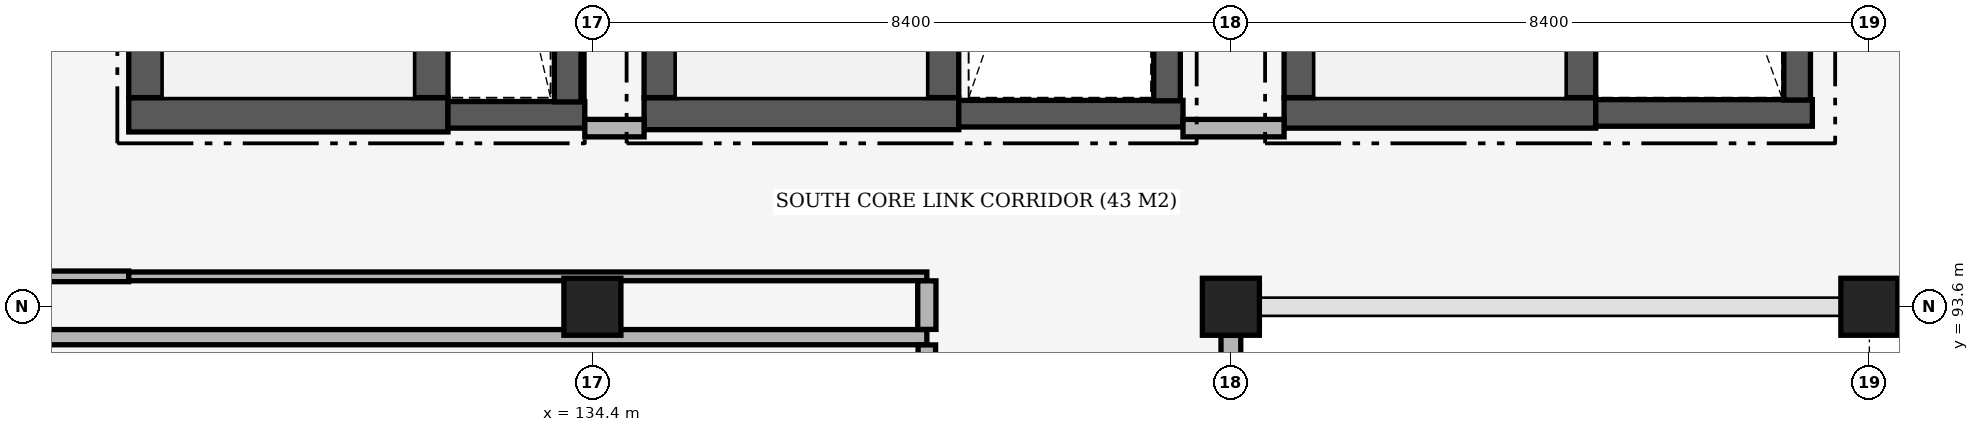
"""IFC4 building model, lengths in metres.
Left out: names, types, materials, properties, quantities, classifications, styles, units other than length and angle.
Written with IfcOpenShell. Run it as: python <this file> out.ifc"""

import sys

from ifc_helpers import new_model, si_unit, direction, frame, frame_2d, origin, origin_2d, place, context, subcontext, project, spatial, rectangle, extrude, element, save


model = new_model("IFC4")
c1 = context("Model", 3, precision=1e-05, world=origin(), true_north=direction((0.0, 1.0)))
c2 = subcontext(c1, "Body", "Model", "MODEL_VIEW")
j1 = project(units=[si_unit("LENGTHUNIT", "METRE"), si_unit("PLANEANGLEUNIT", "RADIAN")], contexts=[c1])
p1 = place(None, origin())
s1 = spatial("IfcSite", under=j1, at=p1, CompositionType="ELEMENT")
p2 = place(p1, origin())
s2 = spatial("IfcBuilding", under=s1, at=p2, CompositionType="ELEMENT")
p3 = place(p2, frame((0.0, 0.0, 15.3)))
s3 = spatial("IfcBuildingStorey", under=s2, at=p3, CompositionType="ELEMENT", Elevation=15.3)
for number, where, z_axis, x_axis in (
    (1, (134.4, 93.6, 0.0), (0.0, 0.0, 1.0), (1.0, 0.0, 0.0)),
    (2, (142.8, 93.6, 0.0), (0.0, 0.0, 1.0), (1.0, 0.0, 0.0)),
    (3, (151.2, 93.6, 0.0), (0.0, 0.0, 1.0), (1.0, 0.0, 0.0)),
):
    element("IfcColumn", number, at=place(p3, frame(where, z_axis=z_axis, x_axis=x_axis)), inside=s3, PredefinedType="COLUMN", context=c2, shape_type="SweptSolid", body=[
        extrude(rectangle(XDim=0.75, YDim=0.75, at=origin_2d()), origin(), (0.0, 0.0, 1.0), 5.1),
    ])
p4 = place(p3, frame((156.225, 93.6, 0.0), z_axis=(0.0, 0.0, 1.0), x_axis=(-1.0, 0.0, 0.0)))
e4 = element("IfcWall", 4, at=p4, inside=s3, PredefinedType="SOLIDWALL", context=c2, shape_type="SweptSolid", body=[
    extrude(rectangle(XDim=4.65, YDim=0.26, at=frame_2d((2.325, 0.0))), origin(), (0.0, 0.0, 1.0), 4.24),
])
p5 = place(p4, frame((2.8, 0.0, 0.9)))
e5 = element("IfcOpeningElement", 5, at=p5, cuts=e4, PredefinedType="OPENING", context=c2, shape_type="SweptSolid", body=[
    extrude(rectangle(XDim=0.9, YDim=2.2, at=frame_2d((0.45, 1.1))), frame((0.0, 0.145, 0.0), z_axis=(0.0, -1.0, 0.0), x_axis=(1.0, 0.0, 0.0)), (0.0, 0.0, 1.0), 0.29),
])
p6 = place(p3, frame((142.8, 93.225, 0.0), z_axis=(0.0, 0.0, 1.0), x_axis=(0.0, -1.0, 0.0)))
e6 = element("IfcWall", 6, at=p6, inside=s3, PredefinedType="SOLIDWALL", context=c2, shape_type="SweptSolid", body=[
    extrude(rectangle(XDim=7.65, YDim=0.26, at=frame_2d((3.825, 0.0))), origin(), (0.0, 0.0, 1.0), 4.14),
])
p7 = place(p6, frame((1.95, 0.0, 0.9)))
e7 = element("IfcOpeningElement", 7, at=p7, cuts=e6, PredefinedType="OPENING", context=c2, shape_type="SweptSolid", body=[
    extrude(rectangle(XDim=0.9, YDim=2.2, at=frame_2d((0.45, 1.1))), frame((0.0, 0.145, 0.0), z_axis=(0.0, -1.0, 0.0), x_axis=(1.0, 0.0, 0.0)), (0.0, 0.0, 1.0), 0.29),
])
p8 = place(p6, frame((4.8, 0.0, 0.9)))
e8 = element("IfcOpeningElement", 8, at=p8, cuts=e6, PredefinedType="OPENING", context=c2, shape_type="SweptSolid", body=[
    extrude(rectangle(XDim=0.9, YDim=2.2, at=frame_2d((0.45, 1.1))), frame((0.0, 0.145, 0.0), z_axis=(0.0, -1.0, 0.0), x_axis=(1.0, 0.0, 0.0)), (0.0, 0.0, 1.0), 0.29),
])
p9 = place(p3, frame((128.3, 96.125, 0.0), z_axis=(0.0, 0.0, 1.0), x_axis=(1.0, 0.0, 0.0)))
e9 = element("IfcWall", 9, at=p9, inside=s3, PredefinedType="SHEAR", context=c2, shape_type="SweptSolid", body=[
    extrude(rectangle(XDim=4.2, YDim=0.45, at=frame_2d((2.1, 0.0))), origin(), (0.0, 0.0, 1.0), 4.84),
])
for number, where, z_axis, x_axis in (
    (10, (128.525, 96.352, 0.0), (0.0, 0.0, 1.0), (0.0, 1.0, 0.0)),
    (11, (132.275, 96.352, 0.0), (0.0, 0.0, 1.0), (0.0, 1.0, 0.0)),
):
    element("IfcWall", number, at=place(p3, frame(where, z_axis=z_axis, x_axis=x_axis)), inside=s3, PredefinedType="SHEAR", context=c2, shape_type="SweptSolid", body=[
        extrude(rectangle(XDim=6.896, YDim=0.45, at=frame_2d((3.448, 0.0))), origin(), (0.0, 0.0, 1.0), 4.84),
    ])
p10 = place(p3, frame((132.5, 96.125, 0.0), z_axis=(0.0, 0.0, 1.0), x_axis=(1.0, 0.0, 0.0)))
e12 = element("IfcWall", 12, at=p10, inside=s3, PredefinedType="SHEAR", context=c2, shape_type="SweptSolid", body=[
    extrude(rectangle(XDim=1.8, YDim=0.35, at=frame_2d((0.9, 0.0))), origin(), (0.0, 0.0, 1.0), 4.84),
])
p11 = place(p3, frame((134.075, 96.295, 0.0), z_axis=(0.0, 0.0, 1.0), x_axis=(0.0, 1.0, 0.0)))
e13 = element("IfcWall", 13, at=p11, inside=s3, PredefinedType="SHEAR", context=c2, shape_type="SweptSolid", body=[
    extrude(rectangle(XDim=7.212, YDim=0.35, at=frame_2d((3.606, 0.0))), origin(), (0.0, 0.0, 1.0), 4.84),
])
p12 = place(p3, frame((135.08, 96.14, 0.0), z_axis=(0.0, 0.0, 1.0), x_axis=(1.0, 0.0, 0.0)))
e14 = element("IfcWall", 14, at=p12, inside=s3, PredefinedType="SHEAR", context=c2, shape_type="SweptSolid", body=[
    extrude(rectangle(XDim=4.14, YDim=0.42, at=frame_2d((2.07, 0.0))), origin(), (0.0, 0.0, 1.0), 4.84),
])
for number, where, z_axis, x_axis in (
    (15, (135.29, 96.352, 0.0), (0.0, 0.0, 1.0), (0.0, 1.0, 0.0)),
    (16, (139.01, 96.352, 0.0), (0.0, 0.0, 1.0), (0.0, 1.0, 0.0)),
):
    element("IfcWall", number, at=place(p3, frame(where, z_axis=z_axis, x_axis=x_axis)), inside=s3, PredefinedType="SHEAR", context=c2, shape_type="SweptSolid", body=[
        extrude(rectangle(XDim=6.896, YDim=0.42, at=frame_2d((3.448, 0.0))), origin(), (0.0, 0.0, 1.0), 4.84),
    ])
p13 = place(p3, frame((139.22, 96.14, 0.0), z_axis=(0.0, 0.0, 1.0), x_axis=(1.0, 0.0, 0.0)))
e17 = element("IfcWall", 17, at=p13, inside=s3, PredefinedType="SHEAR", context=c2, shape_type="SweptSolid", body=[
    extrude(rectangle(XDim=2.95, YDim=0.35, at=frame_2d((1.475, 0.0))), origin(), (0.0, 0.0, 1.0), 4.84),
])
p14 = place(p3, frame((141.96, 96.31, 0.0), z_axis=(0.0, 0.0, 1.0), x_axis=(0.0, 1.0, 0.0)))
e18 = element("IfcWall", 18, at=p14, inside=s3, PredefinedType="SHEAR", context=c2, shape_type="SweptSolid", body=[
    extrude(rectangle(XDim=7.197, YDim=0.35, at=frame_2d((3.599, 0.0))), origin(), (0.0, 0.0, 1.0), 4.84),
])
p15 = place(p3, frame((143.5, 96.15, 0.0), z_axis=(0.0, 0.0, 1.0), x_axis=(1.0, 0.0, 0.0)))
e19 = element("IfcWall", 19, at=p15, inside=s3, PredefinedType="SHEAR", context=c2, shape_type="SweptSolid", body=[
    extrude(rectangle(XDim=4.1, YDim=0.4, at=frame_2d((2.05, 0.0))), origin(), (0.0, 0.0, 1.0), 4.84),
])
for number, where, z_axis, x_axis in (
    (20, (143.7, 96.352, 0.0), (0.0, 0.0, 1.0), (0.0, 1.0, 0.0)),
    (21, (147.4, 96.352, 0.0), (0.0, 0.0, 1.0), (0.0, 1.0, 0.0)),
):
    element("IfcWall", number, at=place(p3, frame(where, z_axis=z_axis, x_axis=x_axis)), inside=s3, PredefinedType="SHEAR", context=c2, shape_type="SweptSolid", body=[
        extrude(rectangle(XDim=6.896, YDim=0.4, at=frame_2d((3.448, 0.0))), origin(), (0.0, 0.0, 1.0), 4.84),
    ])
p16 = place(p3, frame((147.6, 96.15, 0.0), z_axis=(0.0, 0.0, 1.0), x_axis=(1.0, 0.0, 0.0)))
e22 = element("IfcWall", 22, at=p16, inside=s3, PredefinedType="SHEAR", context=c2, shape_type="SweptSolid", body=[
    extrude(rectangle(XDim=2.85, YDim=0.35, at=frame_2d((1.425, 0.0))), origin(), (0.0, 0.0, 1.0), 4.84),
])
p17 = place(p3, frame((150.25, 96.32, 0.0), z_axis=(0.0, 0.0, 1.0), x_axis=(0.0, 1.0, 0.0)))
e23 = element("IfcWall", 23, at=p17, inside=s3, PredefinedType="SHEAR", context=c2, shape_type="SweptSolid", body=[
    extrude(rectangle(XDim=7.187, YDim=0.35, at=frame_2d((3.594, 0.0))), origin(), (0.0, 0.0, 1.0), 4.84),
])
p18 = place(p3, frame((126.115, 93.2, 0.0), z_axis=(0.0, 0.0, 1.0), x_axis=(1.0, 0.0, 0.0)))
e24 = element("IfcWall", 24, at=p18, inside=s3, PredefinedType="PARTITIONING", context=c2, shape_type="SweptSolid", body=[
    extrude(rectangle(XDim=12.685, YDim=0.2, at=frame_2d((6.343, 0.0))), origin(), (0.0, 0.0, 1.0), 4.14),
])
p19 = place(p3, frame((126.132, 94.0, 0.0), z_axis=(0.0, 0.0, 1.0), x_axis=(1.0, 0.0, 0.0)))
e25 = element("IfcWall", 25, at=p19, inside=s3, PredefinedType="PARTITIONING", context=c2, shape_type="SweptSolid", body=[
    extrude(rectangle(XDim=2.168, YDim=0.14, at=frame_2d((1.084, 0.0))), origin(), (0.0, 0.0, 1.0), 4.29),
])
p20 = place(p3, frame((128.3, 94.0, 0.0), z_axis=(0.0, 0.0, 1.0), x_axis=(1.0, 0.0, 0.0)))
e26 = element("IfcWall", 26, at=p20, inside=s3, PredefinedType="PARTITIONING", context=c2, shape_type="SweptSolid", body=[
    extrude(rectangle(XDim=10.5, YDim=0.115, at=frame_2d((5.25, 0.0))), origin(), (0.0, 0.0, 1.0), 4.29),
])
p21 = place(p3, frame((134.3, 95.95, 0.0), z_axis=(0.0, 0.0, 1.0), x_axis=(1.0, 0.0, 0.0)))
e27 = element("IfcWall", 27, at=p21, inside=s3, PredefinedType="SOLIDWALL", context=c2, shape_type="SweptSolid", body=[
    extrude(rectangle(XDim=0.78, YDim=0.23, at=frame_2d((0.39, 0.0))), origin(), (0.0, 0.0, 1.0), 4.29),
])
p22 = place(p3, frame((142.17, 95.95, 0.0), z_axis=(0.0, 0.0, 1.0), x_axis=(1.0, 0.0, 0.0)))
e28 = element("IfcWall", 28, at=p22, inside=s3, PredefinedType="SOLIDWALL", context=c2, shape_type="SweptSolid", body=[
    extrude(rectangle(XDim=1.33, YDim=0.23, at=frame_2d((0.665, 0.0))), origin(), (0.0, 0.0, 1.0), 4.29),
])
p23 = place(p3, frame((138.8, 74.592, 0.0), z_axis=(0.0, 0.0, 1.0), x_axis=(0.0, 1.0, 0.0)))
e29 = element("IfcWall", 29, at=p23, inside=s3, PredefinedType="SOLIDWALL", context=c2, shape_type="SweptSolid", body=[
    extrude(rectangle(XDim=18.506, YDim=0.23, at=frame_2d((9.253, 0.0))), origin(), (0.0, 0.0, 1.0), 4.14),
])
p24 = place(p23, frame((8.728, 0.0, 0.0)))
e30 = element("IfcOpeningElement", 30, at=p24, cuts=e29, PredefinedType="OPENING", context=c2, shape_type="SweptSolid", body=[
    extrude(rectangle(XDim=1.05, YDim=2.1, at=frame_2d((0.525, 1.05))), frame((0.0, 0.13, 0.0), z_axis=(0.0, -1.0, 0.0), x_axis=(1.0, 0.0, 0.0)), (0.0, 0.0, 1.0), 0.26),
])
p25 = place(p3, frame((138.8, 93.302, 0.0), z_axis=(0.0, 0.0, 1.0), x_axis=(0.0, 1.0, 0.0)))
e31 = element("IfcWall", 31, at=p25, inside=s3, PredefinedType="PARTITIONING", context=c2, shape_type="SweptSolid", body=[
    extrude(rectangle(XDim=0.639, YDim=0.24, at=frame_2d((0.319, 0.0))), origin(), (0.0, 0.0, 1.0), 4.14),
])
save(model, sys.argv[1])
